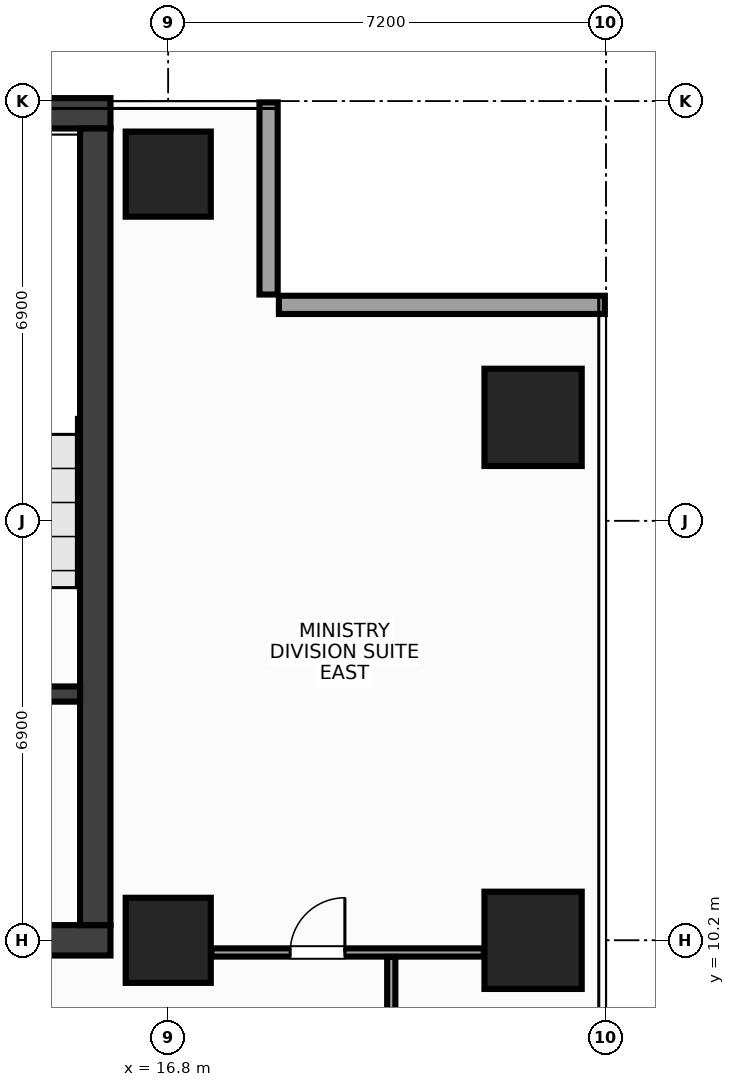
"""IFC4 building model, lengths in metres.
Left out: names, types, materials, properties, quantities, classifications, styles, units other than length and angle.
Written with IfcOpenShell. Run it as: python <this file> out.ifc"""

import sys

from ifc_helpers import new_model, si_unit, direction, frame, frame_2d, origin, origin_2d, place, context, subcontext, project, spatial, rectangle, extrude, source, transform, mapped, element, fill, save


model = new_model("IFC4")
c1 = context("Model", 3, precision=1e-05, world=origin(), true_north=direction((0.0, 1.0)))
c2 = subcontext(c1, "Body", "Model", "MODEL_VIEW")
j1 = project(units=[si_unit("LENGTHUNIT", "METRE"), si_unit("PLANEANGLEUNIT", "RADIAN")], contexts=[c1])
p1 = place(None, origin())
s1 = spatial("IfcSite", under=j1, at=p1, CompositionType="ELEMENT")
p2 = place(p1, origin())
s2 = spatial("IfcBuilding", under=s1, at=p2, CompositionType="ELEMENT")
p3 = place(p2, frame((0.0, 0.0, 203.6)))
s3 = spatial("IfcBuildingStorey", under=s2, at=p3, CompositionType="ELEMENT", Elevation=203.6)
m1 = source(origin(), c2, "Body", "SweptSolid", [
    extrude(rectangle(XDim=31.7, YDim=0.5, at=frame_2d((15.85, 0.0))), origin(), (0.0, 0.0, 1.0), 3.6),
])
p4 = place(p3, frame((-15.85, 23.8, 0.0), z_axis=(0.0, 0.0, 1.0), x_axis=(1.0, 0.0, 0.0)))
e1 = element("IfcWall", 1, at=p4, inside=s3, PredefinedType="SHEAR", context=c2, shape_type="MappedRepresentation", body=[
    mapped(m1, transform((0.0, 0.0, 0.0), x_axis=(1.0, 0.0, 0.0), y_axis=(0.0, 1.0, 0.0), z_axis=(0.0, 0.0, 1.0), scale=1.0)),
])
p5 = place(p3, frame((-15.85, 10.2, 0.0), z_axis=(0.0, 0.0, 1.0), x_axis=(1.0, 0.0, 0.0)))
e2 = element("IfcWall", 2, at=p5, inside=s3, PredefinedType="SHEAR", context=c2, shape_type="MappedRepresentation", body=[
    mapped(m1, transform((0.0, 0.0, 0.0), x_axis=(1.0, 0.0, 0.0), y_axis=(0.0, 1.0, 0.0), z_axis=(0.0, 0.0, 1.0), scale=1.0)),
])
p6 = place(p5, frame((1.7, 0.0, 0.0)))
e3 = element("IfcOpeningElement", 3, at=p6, cuts=e2, PredefinedType="OPENING", context=c2, shape_type="SweptSolid", body=[
    extrude(rectangle(XDim=1.6, YDim=2.15, at=frame_2d((0.8, 1.075))), frame((0.0, 0.262, 0.0), z_axis=(0.0, -1.0, 0.0), x_axis=(1.0, 0.0, 0.0)), (0.0, 0.0, 1.0), 0.524),
])
p7 = place(p5, frame((28.4, 0.0, 0.0)))
e4 = element("IfcOpeningElement", 4, at=p7, cuts=e2, PredefinedType="OPENING", context=c2, shape_type="SweptSolid", body=[
    extrude(rectangle(XDim=1.6, YDim=2.15, at=frame_2d((0.8, 1.075))), frame((0.0, 0.262, 0.0), z_axis=(0.0, -1.0, 0.0), x_axis=(1.0, 0.0, 0.0)), (0.0, 0.0, 1.0), 0.524),
])
p8 = place(p5, frame((15.1, 0.0, 0.0)))
e5 = element("IfcOpeningElement", 5, at=p8, cuts=e2, PredefinedType="OPENING", context=c2, shape_type="SweptSolid", body=[
    extrude(rectangle(XDim=1.5, YDim=2.2, at=frame_2d((0.75, 1.1))), frame((0.0, 0.262, 0.0), z_axis=(0.0, -1.0, 0.0), x_axis=(1.0, 0.0, 0.0)), (0.0, 0.0, 1.0), 0.524),
])
m2 = source(origin(), c2, "Body", "SweptSolid", [
    extrude(rectangle(XDim=13.1, YDim=0.5, at=frame_2d((6.55, 0.0))), origin(), (0.0, 0.0, 1.0), 3.6),
])
p9 = place(p3, frame((15.6, 10.45, 0.0), z_axis=(0.0, 0.0, 1.0), x_axis=(0.0, 1.0, 0.0)))
e6 = element("IfcWall", 6, at=p9, inside=s3, PredefinedType="SHEAR", context=c2, shape_type="MappedRepresentation", body=[
    mapped(m2, transform((0.0, 0.0, 0.0), x_axis=(1.0, 0.0, 0.0), y_axis=(0.0, 1.0, 0.0), z_axis=(0.0, 0.0, 1.0), scale=1.0)),
])
m3 = source(origin(), c2, "Body", "SweptSolid", [
    extrude(rectangle(XDim=3.705, YDim=0.25, at=frame_2d((1.853, 0.0))), origin(), (0.0, 0.0, 1.0), 3.6),
])
p10 = place(p3, frame((11.645, 14.25, 0.0), z_axis=(0.0, 0.0, 1.0), x_axis=(1.0, 0.0, 0.0)))
e7 = element("IfcWall", 7, at=p10, inside=s3, PredefinedType="SHEAR", context=c2, shape_type="MappedRepresentation", body=[
    mapped(m3, transform((0.0, 0.0, 0.0), x_axis=(1.0, 0.0, 0.0), y_axis=(0.0, 1.0, 0.0), z_axis=(0.0, 0.0, 1.0), scale=1.0)),
])
p11 = place(p10, frame((0.95, 0.0, 0.0)))
e8 = element("IfcOpeningElement", 8, at=p11, cuts=e7, PredefinedType="OPENING", context=c2, shape_type="SweptSolid", body=[
    extrude(rectangle(XDim=1.6, YDim=2.15, at=frame_2d((0.8, 1.075))), frame((0.0, 0.137, 0.0), z_axis=(0.0, -1.0, 0.0), x_axis=(1.0, 0.0, 0.0)), (0.0, 0.0, 1.0), 0.274),
])
m4 = source(origin(), c2, "Body", "SweptSolid", [
    extrude(rectangle(XDim=1.4, YDim=1.4, at=origin_2d()), origin(), (0.0, 0.0, 1.0), 3.6),
])
for number, where, z_axis, x_axis in (
    (9, (16.8, 10.2, 0.0), (0.0, 0.0, 1.0), (1.0, 0.0, 0.0)),
    (10, (16.8, 22.8, 0.0), (0.0, 0.0, 1.0), (1.0, 0.0, 0.0)),
):
    element("IfcColumn", number, at=place(p3, frame(where, z_axis=z_axis, x_axis=x_axis)), inside=s3, PredefinedType="COLUMN", context=c2, shape_type="MappedRepresentation", body=[
        mapped(m4, transform((0.0, 0.0, 0.0), x_axis=(1.0, 0.0, 0.0), y_axis=(0.0, 1.0, 0.0), z_axis=(0.0, 0.0, 1.0), scale=1.0)),
    ])
m5 = source(origin(), c2, "Body", "SweptSolid", [
    extrude(rectangle(XDim=1.6, YDim=1.6, at=origin_2d()), origin(), (0.0, 0.0, 1.0), 3.6),
])
for number, where, z_axis, x_axis in (
    (11, (22.8, 10.2, 0.0), (0.0, 0.0, 1.0), (1.0, 0.0, 0.0)),
    (12, (22.8, 18.8, 0.0), (0.0, 0.0, 1.0), (1.0, 0.0, 0.0)),
):
    element("IfcColumn", number, at=place(p3, frame(where, z_axis=z_axis, x_axis=x_axis)), inside=s3, PredefinedType="COLUMN", context=c2, shape_type="MappedRepresentation", body=[
        mapped(m5, transform((0.0, 0.0, 0.0), x_axis=(1.0, 0.0, 0.0), y_axis=(0.0, 1.0, 0.0), z_axis=(0.0, 0.0, 1.0), scale=1.0)),
    ])
m6 = source(origin(), c2, "Body", "SweptSolid", [
    extrude(rectangle(XDim=5.36, YDim=0.3, at=frame_2d((2.68, 0.0))), origin(), (0.0, 0.0, 1.0), 2.76),
])
p12 = place(p3, frame((23.98, 20.65, 0.0), z_axis=(0.0, 0.0, 1.0), x_axis=(-1.0, 0.0, 0.0)))
e13 = element("IfcWall", 13, at=p12, inside=s3, PredefinedType="STANDARD", context=c2, shape_type="MappedRepresentation", body=[
    mapped(m6, transform((0.0, 0.0, 0.0), x_axis=(1.0, 0.0, 0.0), y_axis=(0.0, 1.0, 0.0), z_axis=(0.0, 0.0, 1.0), scale=1.0)),
])
m7 = source(origin(), c2, "Body", "SweptSolid", [
    extrude(rectangle(XDim=3.16, YDim=0.3, at=frame_2d((1.58, 0.0))), origin(), (0.0, 0.0, 1.0), 2.76),
])
p13 = place(p3, frame((18.45, 20.82, 0.0), z_axis=(0.0, 0.0, 1.0), x_axis=(0.0, 1.0, 0.0)))
e14 = element("IfcWall", 14, at=p13, inside=s3, PredefinedType="STANDARD", context=c2, shape_type="MappedRepresentation", body=[
    mapped(m7, transform((0.0, 0.0, 0.0), x_axis=(1.0, 0.0, 0.0), y_axis=(0.0, 1.0, 0.0), z_axis=(0.0, 0.0, 1.0), scale=1.0)),
])
m8 = source(origin(), c2, "Body", "SweptSolid", [
    extrude(rectangle(XDim=4.48, YDim=0.135, at=frame_2d((2.24, 0.0))), origin(), (0.0, 0.0, 1.0), 2.915),
])
p14 = place(p3, frame((17.51, 10.0, 0.0), z_axis=(0.0, 0.0, 1.0), x_axis=(1.0, 0.0, 0.0)))
e15 = element("IfcWall", 15, at=p14, inside=s3, PredefinedType="PARTITIONING", context=c2, shape_type="MappedRepresentation", body=[
    mapped(m8, transform((0.0, 0.0, 0.0), x_axis=(1.0, 0.0, 0.0), y_axis=(0.0, 1.0, 0.0), z_axis=(0.0, 0.0, 1.0), scale=1.0)),
])
p15 = place(p14, frame((1.295, 0.0, 0.0)))
e16 = element("IfcOpeningElement", 16, at=p15, cuts=e15, PredefinedType="OPENING", context=c2, shape_type="SweptSolid", body=[
    extrude(rectangle(XDim=0.9, YDim=2.15, at=frame_2d((0.45, 1.075))), frame((0.0, 0.08, 0.0), z_axis=(0.0, -1.0, 0.0), x_axis=(1.0, 0.0, 0.0)), (0.0, 0.0, 1.0), 0.159),
])
m9 = source(origin(), c2, "Body", "SweptSolid", [
    extrude(rectangle(XDim=2.373, YDim=0.135, at=frame_2d((1.186, 0.0))), origin(), (0.0, 0.0, 1.0), 3.38),
])
p16 = place(p3, frame((20.468, 7.555, 0.0), z_axis=(0.0, 0.0, 1.0), x_axis=(0.0, 1.0, 0.0)))
e17 = element("IfcWall", 17, at=p16, inside=s3, PredefinedType="PARTITIONING", context=c2, shape_type="MappedRepresentation", body=[
    mapped(m9, transform((0.0, 0.0, 0.0), x_axis=(1.0, 0.0, 0.0), y_axis=(0.0, 1.0, 0.0), z_axis=(0.0, 0.0, 1.0), scale=1.0)),
])
m10 = source(origin(), c2, "Body", "SweptSolid", [
    extrude(rectangle(XDim=0.9, YDim=2.15, at=frame_2d((0.45, 1.075))), frame((0.0, 0.025, 0.0), z_axis=(0.0, -1.0, 0.0), x_axis=(1.0, 0.0, 0.0)), (0.0, 0.0, 1.0), 0.05),
])
p17 = place(p15, origin())
e18 = element("IfcDoor", 18, at=p17, inside=s3, OperationType="SINGLE_SWING_RIGHT", PredefinedType="DOOR", context=c2, shape_type="MappedRepresentation", body=[
    mapped(m10, transform((0.0, 0.0, 0.0), x_axis=(1.0, 0.0, 0.0), y_axis=(0.0, 1.0, 0.0), z_axis=(0.0, 0.0, 1.0), scale=1.0)),
])
fill(e16, e18)
save(model, sys.argv[1])
